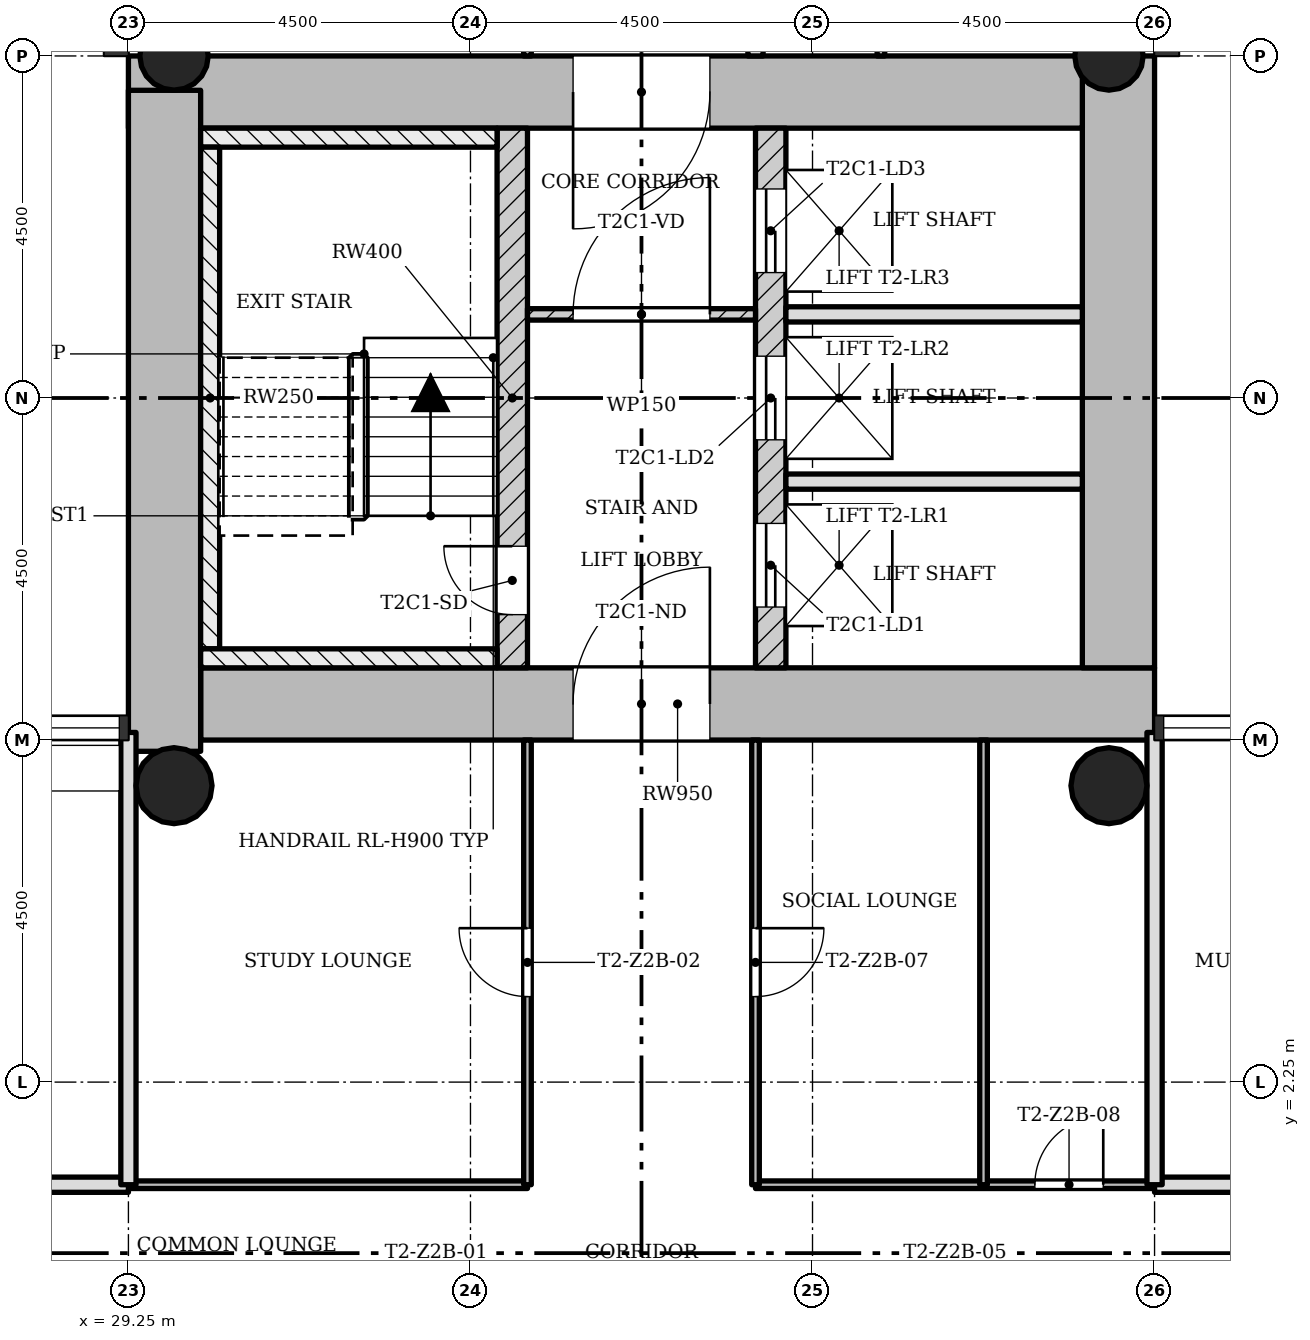
"""IFC4 building model, lengths in metres.
Left out: names, types, materials, properties, quantities, classifications, styles, units other than length and angle.
Written with IfcOpenShell. Run it as: python <this file> out.ifc"""

import sys

from ifc_helpers import new_model, si_unit, direction, frame, frame_2d, origin, origin_2d, place, context, subcontext, project, spatial, rectangle, hollow_circle, extrude, element, fill, save


model = new_model("IFC4")
c1 = context("Model", 3, precision=1e-05, world=origin(), true_north=direction((0.0, 1.0)))
c2 = subcontext(c1, "Body", "Model", "MODEL_VIEW")
j1 = project(units=[si_unit("LENGTHUNIT", "METRE"), si_unit("PLANEANGLEUNIT", "RADIAN")], contexts=[c1])
p1 = place(None, origin())
s1 = spatial("IfcSite", under=j1, at=p1, CompositionType="ELEMENT")
p2 = place(p1, origin())
s2 = spatial("IfcBuilding", under=s1, at=p2, CompositionType="ELEMENT")
p3 = place(p2, frame((0.0, 0.0, 83.4)))
s3 = spatial("IfcBuildingStorey", under=s2, at=p3, CompositionType="ELEMENT", Elevation=83.4)
p4 = place(p3, frame((30.2, 7.225, 0.0), z_axis=(0.0, 0.0, 1.0), x_axis=(1.0, 0.0, 0.0)))
e1 = element("IfcWall", 1, at=p4, inside=s3, PredefinedType="SHEAR", context=c2, shape_type="SweptSolid", body=[
    extrude(rectangle(XDim=12.55, YDim=0.95, at=frame_2d((6.275, 0.0))), origin(), (0.0, 0.0, 1.0), 3.4),
])
p5 = place(p4, frame((4.9, 0.0, 0.0)))
e2 = element("IfcOpeningElement", 2, at=p5, cuts=e1, PredefinedType="OPENING", context=c2, shape_type="SweptSolid", body=[
    extrude(rectangle(XDim=1.8, YDim=2.1, at=frame_2d((0.9, 1.05))), frame((0.0, 0.485, 0.0), z_axis=(0.0, -1.0, 0.0), x_axis=(1.0, 0.0, 0.0)), (0.0, 0.0, 1.0), 0.97),
])
p6 = place(p3, frame((42.275, 7.7, 0.0), z_axis=(0.0, 0.0, 1.0), x_axis=(0.0, 1.0, 0.0)))
e3 = element("IfcWall", 3, at=p6, inside=s3, PredefinedType="SHEAR", context=c2, shape_type="SweptSolid", body=[
    extrude(rectangle(XDim=8.05, YDim=0.95, at=frame_2d((4.025, 0.0))), origin(), (0.0, 0.0, 1.0), 3.4),
])
p7 = place(p3, frame((41.8, 15.275, 0.0), z_axis=(0.0, 0.0, 1.0), x_axis=(-1.0, 0.0, 0.0)))
e4 = element("IfcWall", 4, at=p7, inside=s3, PredefinedType="SHEAR", context=c2, shape_type="SweptSolid", body=[
    extrude(rectangle(XDim=12.55, YDim=0.95, at=frame_2d((6.275, 0.0))), origin(), (0.0, 0.0, 1.0), 3.4),
])
p8 = place(p7, frame((4.9, 0.0, 0.0)))
e5 = element("IfcOpeningElement", 5, at=p8, cuts=e4, PredefinedType="OPENING", context=c2, shape_type="SweptSolid", body=[
    extrude(rectangle(XDim=1.8, YDim=2.1, at=frame_2d((0.9, 1.05))), frame((0.0, 0.485, 0.0), z_axis=(0.0, -1.0, 0.0), x_axis=(1.0, 0.0, 0.0)), (0.0, 0.0, 1.0), 0.97),
])
p9 = place(p3, frame((29.725, 15.298, 0.0), z_axis=(0.0, 0.0, 1.0), x_axis=(0.0, -1.0, 0.0)))
e6 = element("IfcWall", 6, at=p9, inside=s3, PredefinedType="SHEAR", context=c2, shape_type="SweptSolid", body=[
    extrude(rectangle(XDim=8.696, YDim=0.95, at=frame_2d((4.348, 0.0))), origin(), (0.0, 0.0, 1.0), 3.4),
])
p10 = place(p3, frame((34.3, 7.7, 0.0), z_axis=(0.0, 0.0, 1.0), x_axis=(0.0, 1.0, 0.0)))
e7 = element("IfcWall", 7, at=p10, inside=s3, PredefinedType="SHEAR", context=c2, shape_type="SweptSolid", body=[
    extrude(rectangle(XDim=7.1, YDim=0.4, at=frame_2d((3.55, 0.0))), origin(), (0.0, 0.0, 1.0), 3.4),
])
p11 = place(p10, frame((0.7, 0.0, 0.0)))
e8 = element("IfcOpeningElement", 8, at=p11, cuts=e7, PredefinedType="OPENING", context=c2, shape_type="SweptSolid", body=[
    extrude(rectangle(XDim=0.9, YDim=2.1, at=frame_2d((0.45, 1.05))), frame((0.0, 0.21, 0.0), z_axis=(0.0, -1.0, 0.0), x_axis=(1.0, 0.0, 0.0)), (0.0, 0.0, 1.0), 0.42),
])
p12 = place(p3, frame((37.7, 7.7, 0.0), z_axis=(0.0, 0.0, 1.0), x_axis=(0.0, 1.0, 0.0)))
e9 = element("IfcWall", 9, at=p12, inside=s3, PredefinedType="SHEAR", context=c2, shape_type="SweptSolid", body=[
    extrude(rectangle(XDim=7.1, YDim=0.4, at=frame_2d((3.55, 0.0))), origin(), (0.0, 0.0, 1.0), 3.4),
])
p13 = place(p12, frame((0.8, 0.0, 0.0)))
e10 = element("IfcOpeningElement", 10, at=p13, cuts=e9, PredefinedType="OPENING", context=c2, shape_type="SweptSolid", body=[
    extrude(rectangle(XDim=1.1, YDim=2.1, at=frame_2d((0.55, 1.05))), frame((0.0, 0.21, 0.0), z_axis=(0.0, -1.0, 0.0), x_axis=(1.0, 0.0, 0.0)), (0.0, 0.0, 1.0), 0.42),
])
p14 = place(p12, frame((3.0, 0.0, 0.0)))
e11 = element("IfcOpeningElement", 11, at=p14, cuts=e9, PredefinedType="OPENING", context=c2, shape_type="SweptSolid", body=[
    extrude(rectangle(XDim=1.1, YDim=2.1, at=frame_2d((0.55, 1.05))), frame((0.0, 0.21, 0.0), z_axis=(0.0, -1.0, 0.0), x_axis=(1.0, 0.0, 0.0)), (0.0, 0.0, 1.0), 0.42),
])
p15 = place(p12, frame((5.2, 0.0, 0.0)))
e12 = element("IfcOpeningElement", 12, at=p15, cuts=e9, PredefinedType="OPENING", context=c2, shape_type="SweptSolid", body=[
    extrude(rectangle(XDim=1.1, YDim=2.1, at=frame_2d((0.55, 1.05))), frame((0.0, 0.21, 0.0), z_axis=(0.0, -1.0, 0.0), x_axis=(1.0, 0.0, 0.0)), (0.0, 0.0, 1.0), 0.42),
])
for number, where, z_axis, x_axis in (
    (13, (42.15, 15.75, 0.0), (0.0, 0.0, 1.0), (1.0, 0.0, 0.0)),
    (14, (29.85, 15.75, 0.0), (0.0, 0.0, 1.0), (1.0, 0.0, 0.0)),
):
    element("IfcColumn", number, at=place(p3, frame(where, z_axis=z_axis, x_axis=x_axis)), inside=s3, PredefinedType="COLUMN", context=c2, shape_type="SweptSolid", body=[
        extrude(hollow_circle(Radius=0.45, WallThickness=0.032, at=origin_2d()), origin(), (0.0, 0.0, 1.0), 3.4),
    ])
for number, where, z_axis, x_axis in (
    (15, (42.15, 6.15, 0.0), (0.0, 0.0, 1.0), (1.0, 0.0, 0.0)),
    (16, (29.85, 6.15, 0.0), (0.0, 0.0, 1.0), (1.0, 0.0, 0.0)),
):
    element("IfcColumn", number, at=place(p3, frame(where, z_axis=z_axis, x_axis=x_axis)), inside=s3, PredefinedType="COLUMN", context=c2, shape_type="SweptSolid", body=[
        extrude(hollow_circle(Radius=0.5, WallThickness=0.036, at=origin_2d()), origin(), (0.0, 0.0, 1.0), 3.4),
    ])
p16 = place(p3, frame((37.5, 12.35, 0.0), z_axis=(0.0, 0.0, 1.0), x_axis=(-1.0, 0.0, 0.0)))
e17 = element("IfcWall", 17, at=p16, inside=s3, PredefinedType="PARTITIONING", context=c2, shape_type="SweptSolid", body=[
    extrude(rectangle(XDim=3.0, YDim=0.15, at=frame_2d((1.5, 0.0))), origin(), (0.0, 0.0, 1.0), 3.0),
])
p17 = place(p16, frame((0.6, 0.0, 0.0)))
e18 = element("IfcOpeningElement", 18, at=p17, cuts=e17, PredefinedType="OPENING", context=c2, shape_type="SweptSolid", body=[
    extrude(rectangle(XDim=1.8, YDim=2.1, at=frame_2d((0.9, 1.05))), frame((0.0, 0.085, 0.0), z_axis=(0.0, -1.0, 0.0), x_axis=(1.0, 0.0, 0.0)), (0.0, 0.0, 1.0), 0.17),
])
for number, where, z_axis, x_axis in (
    (19, (41.8, 10.15, 0.0), (0.0, 0.0, 1.0), (-1.0, 0.0, 0.0)),
    (20, (41.8, 12.35, 0.0), (0.0, 0.0, 1.0), (-1.0, 0.0, 0.0)),
):
    element("IfcWall", number, at=place(p3, frame(where, z_axis=z_axis, x_axis=x_axis)), inside=s3, PredefinedType="SOLIDWALL", context=c2, shape_type="SweptSolid", body=[
        extrude(rectangle(XDim=3.9, YDim=0.2, at=frame_2d((1.95, 0.0))), origin(), (0.0, 0.0, 1.0), 3.0),
    ])
p18 = place(p3, frame((42.75, 0.9, 0.0), z_axis=(0.0, 0.0, 1.0), x_axis=(-1.0, 0.0, 0.0)))
e21 = element("IfcWall", 21, at=p18, inside=s3, PredefinedType="PARTITIONING", context=c2, shape_type="SweptSolid", body=[
    extrude(rectangle(XDim=5.25, YDim=0.1, at=frame_2d((2.625, 0.0))), origin(), (0.0, 0.0, 1.0), 3.0),
])
p19 = place(p18, frame((0.675, 0.0, 0.0)))
e22 = element("IfcOpeningElement", 22, at=p19, cuts=e21, PredefinedType="OPENING", context=c2, shape_type="SweptSolid", body=[
    extrude(rectangle(XDim=0.9, YDim=2.1, at=frame_2d((0.45, 1.05))), frame((0.0, 0.06, 0.0), z_axis=(0.0, -1.0, 0.0), x_axis=(1.0, 0.0, 0.0)), (0.0, 0.0, 1.0), 0.12),
])
p20 = place(p3, frame((34.5, 0.9, 0.0), z_axis=(0.0, 0.0, 1.0), x_axis=(-1.0, 0.0, 0.0)))
e23 = element("IfcWall", 23, at=p20, inside=s3, PredefinedType="PARTITIONING", context=c2, shape_type="SweptSolid", body=[
    extrude(rectangle(XDim=5.25, YDim=0.1, at=frame_2d((2.625, 0.0))), origin(), (0.0, 0.0, 1.0), 3.0),
])
for number, where, z_axis, x_axis in (
    (24, (44.55, 0.9, 0.0), (0.0, 0.0, 1.0), (-1.0, 0.0, 0.0)),
    (25, (29.25, 0.9, 0.0), (0.0, 0.0, 1.0), (-1.0, 0.0, 0.0)),
):
    element("IfcWall", number, at=place(p3, frame(where, z_axis=z_axis, x_axis=x_axis)), inside=s3, PredefinedType="SOLIDWALL", context=c2, shape_type="SweptSolid", body=[
        extrude(rectangle(XDim=1.8, YDim=0.2, at=frame_2d((0.9, 0.0))), origin(), (0.0, 0.0, 1.0), 3.0),
    ])
p21 = place(p3, frame((42.75, 0.9, 0.0), z_axis=(0.0, 0.0, 1.0), x_axis=(0.0, 1.0, 0.0)))
e26 = element("IfcWall", 26, at=p21, inside=s3, PredefinedType="SOLIDWALL", context=c2, shape_type="SweptSolid", body=[
    extrude(rectangle(XDim=5.95, YDim=0.2, at=frame_2d((2.975, 0.0))), origin(), (0.0, 0.0, 1.0), 3.0),
])
p22 = place(p3, frame((40.5, 0.9, 0.0), z_axis=(0.0, 0.0, 1.0), x_axis=(0.0, 1.0, 0.0)))
e27 = element("IfcWall", 27, at=p22, inside=s3, PredefinedType="PARTITIONING", context=c2, shape_type="SweptSolid", body=[
    extrude(rectangle(XDim=5.85, YDim=0.1, at=frame_2d((2.925, 0.0))), origin(), (0.0, 0.0, 1.0), 3.0),
])
p23 = place(p3, frame((39.15, 15.75, 0.0), z_axis=(0.0, 0.0, 1.0), x_axis=(0.0, 1.0, 0.0)))
e28 = element("IfcWall", 28, at=p23, inside=s3, PredefinedType="PARTITIONING", context=c2, shape_type="SweptSolid", body=[
    extrude(rectangle(XDim=4.5, YDim=0.1, at=frame_2d((2.25, 0.0))), origin(), (0.0, 0.0, 1.0), 3.0),
])
p24 = place(p23, frame((3.0, 0.0, 0.0)))
e29 = element("IfcOpeningElement", 29, at=p24, cuts=e28, PredefinedType="OPENING", context=c2, shape_type="SweptSolid", body=[
    extrude(rectangle(XDim=0.9, YDim=2.1, at=frame_2d((0.45, 1.05))), frame((0.0, 0.06, 0.0), z_axis=(0.0, -1.0, 0.0), x_axis=(1.0, 0.0, 0.0)), (0.0, 0.0, 1.0), 0.12),
])
p25 = place(p3, frame((37.5, 0.9, 0.0), z_axis=(0.0, 0.0, 1.0), x_axis=(0.0, 1.0, 0.0)))
e30 = element("IfcWall", 30, at=p25, inside=s3, PredefinedType="PARTITIONING", context=c2, shape_type="SweptSolid", body=[
    extrude(rectangle(XDim=5.85, YDim=0.1, at=frame_2d((2.925, 0.0))), origin(), (0.0, 0.0, 1.0), 3.0),
])
p26 = place(p25, frame((2.475, 0.0, 0.0)))
e31 = element("IfcOpeningElement", 31, at=p26, cuts=e30, PredefinedType="OPENING", context=c2, shape_type="SweptSolid", body=[
    extrude(rectangle(XDim=0.9, YDim=2.1, at=frame_2d((0.45, 1.05))), frame((0.0, 0.06, 0.0), z_axis=(0.0, -1.0, 0.0), x_axis=(1.0, 0.0, 0.0)), (0.0, 0.0, 1.0), 0.12),
])
p27 = place(p3, frame((37.5, 15.75, 0.0), z_axis=(0.0, 0.0, 1.0), x_axis=(0.0, 1.0, 0.0)))
e32 = element("IfcWall", 32, at=p27, inside=s3, PredefinedType="SOLIDWALL", context=c2, shape_type="SweptSolid", body=[
    extrude(rectangle(XDim=4.5, YDim=0.2, at=frame_2d((2.25, 0.0))), origin(), (0.0, 0.0, 1.0), 3.0),
])
p28 = place(p27, frame((3.0, 0.0, 0.0)))
e33 = element("IfcOpeningElement", 33, at=p28, cuts=e32, PredefinedType="OPENING", context=c2, shape_type="SweptSolid", body=[
    extrude(rectangle(XDim=0.9, YDim=2.1, at=frame_2d((0.45, 1.05))), frame((0.0, 0.11, 0.0), z_axis=(0.0, -1.0, 0.0), x_axis=(1.0, 0.0, 0.0)), (0.0, 0.0, 1.0), 0.22),
])
p29 = place(p3, frame((34.5, 0.9, 0.0), z_axis=(0.0, 0.0, 1.0), x_axis=(0.0, 1.0, 0.0)))
e34 = element("IfcWall", 34, at=p29, inside=s3, PredefinedType="PARTITIONING", context=c2, shape_type="SweptSolid", body=[
    extrude(rectangle(XDim=5.85, YDim=0.1, at=frame_2d((2.925, 0.0))), origin(), (0.0, 0.0, 1.0), 3.0),
])
p30 = place(p29, frame((2.475, 0.0, 0.0)))
e35 = element("IfcOpeningElement", 35, at=p30, cuts=e34, PredefinedType="OPENING", context=c2, shape_type="SweptSolid", body=[
    extrude(rectangle(XDim=0.9, YDim=2.1, at=frame_2d((0.45, 1.05))), frame((0.0, 0.06, 0.0), z_axis=(0.0, -1.0, 0.0), x_axis=(1.0, 0.0, 0.0)), (0.0, 0.0, 1.0), 0.12),
])
p31 = place(p3, frame((34.5, 15.75, 0.0), z_axis=(0.0, 0.0, 1.0), x_axis=(0.0, 1.0, 0.0)))
e36 = element("IfcWall", 36, at=p31, inside=s3, PredefinedType="PARTITIONING", context=c2, shape_type="SweptSolid", body=[
    extrude(rectangle(XDim=4.5, YDim=0.1, at=frame_2d((2.25, 0.0))), origin(), (0.0, 0.0, 1.0), 3.0),
])
p32 = place(p31, frame((1.8, 0.0, 0.0)))
e37 = element("IfcOpeningElement", 37, at=p32, cuts=e36, PredefinedType="OPENING", context=c2, shape_type="SweptSolid", body=[
    extrude(rectangle(XDim=0.9, YDim=2.1, at=frame_2d((0.45, 1.05))), frame((0.0, 0.06, 0.0), z_axis=(0.0, -1.0, 0.0), x_axis=(1.0, 0.0, 0.0)), (0.0, 0.0, 1.0), 0.12),
])
p33 = place(p3, frame((29.25, 0.9, 0.0), z_axis=(0.0, 0.0, 1.0), x_axis=(0.0, 1.0, 0.0)))
e38 = element("IfcWall", 38, at=p33, inside=s3, PredefinedType="SOLIDWALL", context=c2, shape_type="SweptSolid", body=[
    extrude(rectangle(XDim=5.95, YDim=0.2, at=frame_2d((2.975, 0.0))), origin(), (0.0, 0.0, 1.0), 3.0),
])
p34 = place(p3, frame((34.1, 14.675, 0.0), z_axis=(0.0, 0.0, 1.0), x_axis=(-1.0, 0.0, 0.0)))
e39 = element("IfcWall", 39, at=p34, inside=s3, PredefinedType="SHEAR", context=c2, shape_type="SweptSolid", body=[
    extrude(rectangle(XDim=3.9, YDim=0.25, at=frame_2d((1.95, 0.0))), origin(), (0.0, 0.0, 1.0), 3.4),
])
p35 = place(p3, frame((30.325, 7.95, 0.0), z_axis=(0.0, 0.0, 1.0), x_axis=(0.0, 1.0, 0.0)))
e40 = element("IfcWall", 40, at=p35, inside=s3, PredefinedType="SHEAR", context=c2, shape_type="SweptSolid", body=[
    extrude(rectangle(XDim=6.6, YDim=0.25, at=frame_2d((3.3, 0.0))), origin(), (0.0, 0.0, 1.0), 3.4),
])
p36 = place(p3, frame((34.1, 7.825, 0.0), z_axis=(0.0, 0.0, 1.0), x_axis=(-1.0, 0.0, 0.0)))
e41 = element("IfcWall", 41, at=p36, inside=s3, PredefinedType="SHEAR", context=c2, shape_type="SweptSolid", body=[
    extrude(rectangle(XDim=3.9, YDim=0.25, at=frame_2d((1.95, 0.0))), origin(), (0.0, 0.0, 1.0), 3.4),
])
p37 = place(p17, origin())
e42 = element("IfcDoor", 42, at=p37, inside=s3, OperationType="SINGLE_SWING_LEFT", PredefinedType="DOOR", context=c2, shape_type="SweptSolid", body=[
    extrude(rectangle(XDim=1.8, YDim=2.1, at=frame_2d((0.9, 1.05))), frame((0.0, 0.025, 0.0), z_axis=(0.0, -1.0, 0.0), x_axis=(1.0, 0.0, 0.0)), (0.0, 0.0, 1.0), 0.05),
])
fill(e18, e42)
p38 = place(p30, origin())
e43 = element("IfcDoor", 43, at=p38, inside=s3, OperationType="SINGLE_SWING_LEFT", PredefinedType="DOOR", context=c2, shape_type="SweptSolid", body=[
    extrude(rectangle(XDim=0.9, YDim=2.1, at=frame_2d((0.45, 1.05))), frame((0.0, 0.025, 0.0), z_axis=(0.0, -1.0, 0.0), x_axis=(1.0, 0.0, 0.0)), (0.0, 0.0, 1.0), 0.05),
])
fill(e35, e43)
p39 = place(p26, origin())
e44 = element("IfcDoor", 44, at=p39, inside=s3, OperationType="SINGLE_SWING_RIGHT", PredefinedType="DOOR", context=c2, shape_type="SweptSolid", body=[
    extrude(rectangle(XDim=0.9, YDim=2.1, at=frame_2d((0.45, 1.05))), frame((0.0, 0.025, 0.0), z_axis=(0.0, -1.0, 0.0), x_axis=(1.0, 0.0, 0.0)), (0.0, 0.0, 1.0), 0.05),
])
fill(e31, e44)
p40 = place(p19, origin())
e45 = element("IfcDoor", 45, at=p40, inside=s3, OperationType="SINGLE_SWING_LEFT", PredefinedType="DOOR", context=c2, shape_type="SweptSolid", body=[
    extrude(rectangle(XDim=0.9, YDim=2.1, at=frame_2d((0.45, 1.05))), frame((0.0, 0.025, 0.0), z_axis=(0.0, -1.0, 0.0), x_axis=(1.0, 0.0, 0.0)), (0.0, 0.0, 1.0), 0.05),
])
fill(e22, e45)
p41 = place(p11, origin())
e46 = element("IfcDoor", 46, at=p41, inside=s3, OperationType="SINGLE_SWING_LEFT", PredefinedType="DOOR", context=c2, shape_type="SweptSolid", body=[
    extrude(rectangle(XDim=0.9, YDim=2.1, at=frame_2d((0.45, 1.05))), frame((0.0, 0.025, 0.0), z_axis=(0.0, -1.0, 0.0), x_axis=(1.0, 0.0, 0.0)), (0.0, 0.0, 1.0), 0.05),
])
fill(e8, e46)
p42 = place(p13, origin())
e47 = element("IfcDoor", 47, at=p42, inside=s3, OperationType="SLIDING_TO_LEFT", PredefinedType="DOOR", context=c2, shape_type="SweptSolid", body=[
    extrude(rectangle(XDim=1.1, YDim=2.1, at=frame_2d((0.55, 1.05))), frame((0.0, 0.025, 0.0), z_axis=(0.0, -1.0, 0.0), x_axis=(1.0, 0.0, 0.0)), (0.0, 0.0, 1.0), 0.05),
])
fill(e10, e47)
p43 = place(p14, origin())
e48 = element("IfcDoor", 48, at=p43, inside=s3, OperationType="SLIDING_TO_LEFT", PredefinedType="DOOR", context=c2, shape_type="SweptSolid", body=[
    extrude(rectangle(XDim=1.1, YDim=2.1, at=frame_2d((0.55, 1.05))), frame((0.0, 0.025, 0.0), z_axis=(0.0, -1.0, 0.0), x_axis=(1.0, 0.0, 0.0)), (0.0, 0.0, 1.0), 0.05),
])
fill(e11, e48)
p44 = place(p15, origin())
e49 = element("IfcDoor", 49, at=p44, inside=s3, OperationType="SLIDING_TO_LEFT", PredefinedType="DOOR", context=c2, shape_type="SweptSolid", body=[
    extrude(rectangle(XDim=1.1, YDim=2.1, at=frame_2d((0.55, 1.05))), frame((0.0, 0.025, 0.0), z_axis=(0.0, -1.0, 0.0), x_axis=(1.0, 0.0, 0.0)), (0.0, 0.0, 1.0), 0.05),
])
fill(e12, e49)
p45 = place(p5, origin())
e50 = element("IfcDoor", 50, at=p45, inside=s3, OperationType="SINGLE_SWING_LEFT", PredefinedType="DOOR", context=c2, shape_type="SweptSolid", body=[
    extrude(rectangle(XDim=1.8, YDim=2.1, at=frame_2d((0.9, 1.05))), frame((0.0, 0.025, 0.0), z_axis=(0.0, -1.0, 0.0), x_axis=(1.0, 0.0, 0.0)), (0.0, 0.0, 1.0), 0.05),
])
fill(e2, e50)
p46 = place(p8, origin())
e51 = element("IfcDoor", 51, at=p46, inside=s3, OperationType="SINGLE_SWING_LEFT", PredefinedType="DOOR", context=c2, shape_type="SweptSolid", body=[
    extrude(rectangle(XDim=1.8, YDim=2.1, at=frame_2d((0.9, 1.05))), frame((0.0, 0.025, 0.0), z_axis=(0.0, -1.0, 0.0), x_axis=(1.0, 0.0, 0.0)), (0.0, 0.0, 1.0), 0.05),
])
fill(e5, e51)
save(model, sys.argv[1])
